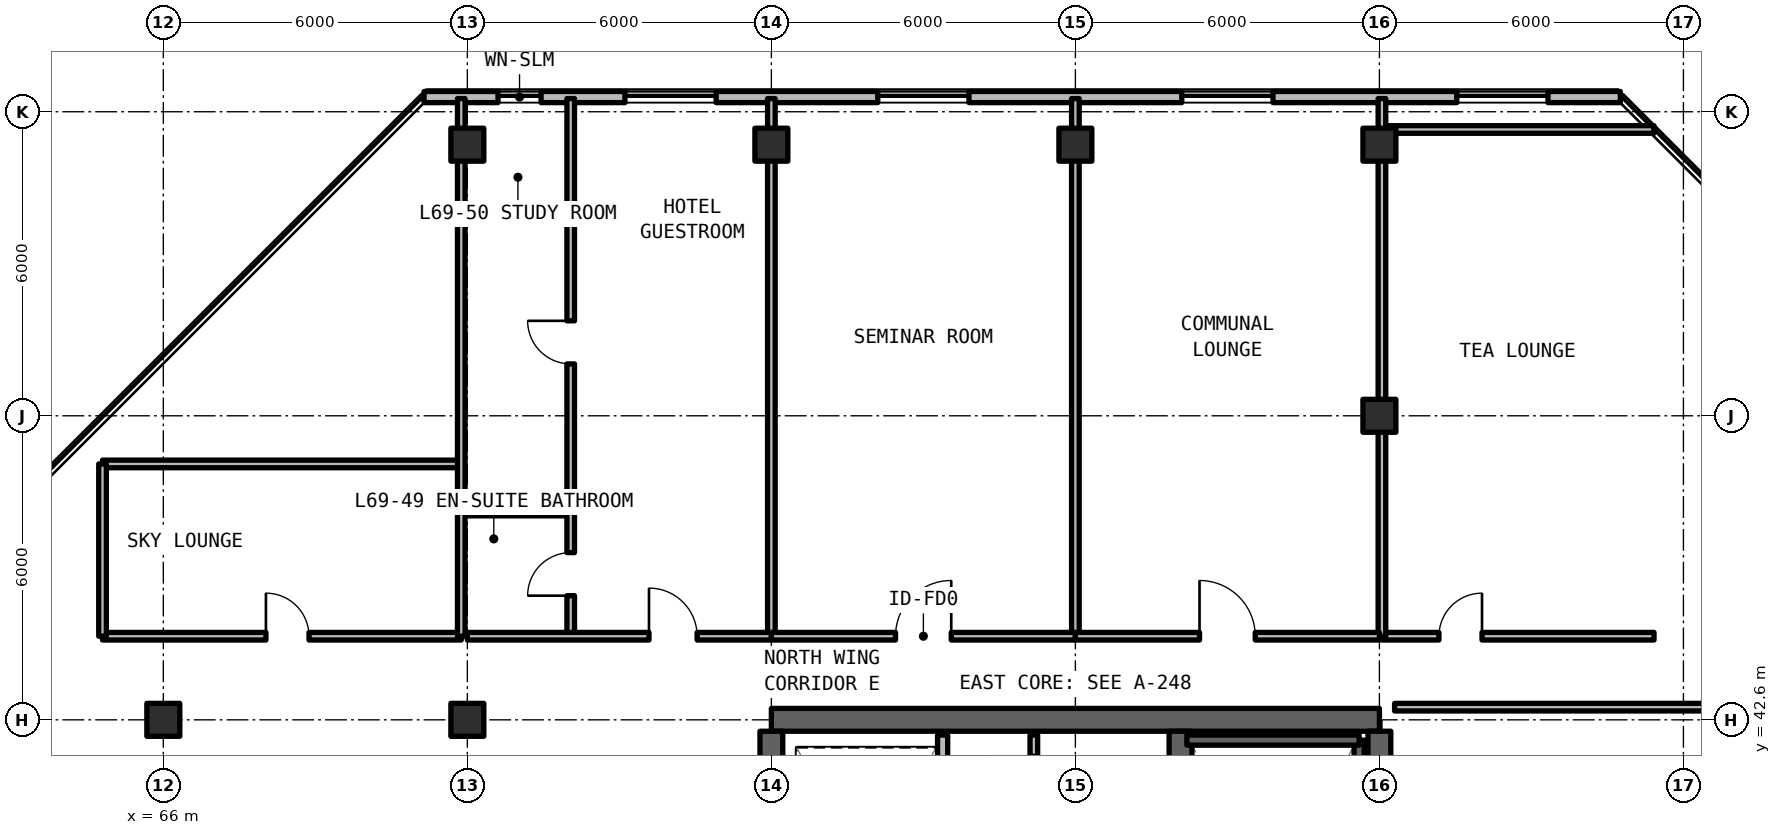
"""IFC4 building model, lengths in metres.
Left out: names, types, materials, properties, quantities, classifications, styles, units other than length and angle.
Written with IfcOpenShell. Run it as: python <this file> out.ifc"""

import sys

from ifc_helpers import new_model, si_unit, direction, frame, frame_2d, origin, origin_2d, place, context, subcontext, project, spatial, rectangle, extrude, element, fill, save


model = new_model("IFC4")
c1 = context("Model", 3, precision=1e-05, world=origin(), true_north=direction((0.0, 1.0)))
c2 = subcontext(c1, "Body", "Model", "MODEL_VIEW")
j1 = project(units=[si_unit("LENGTHUNIT", "METRE"), si_unit("PLANEANGLEUNIT", "RADIAN")], contexts=[c1])
p1 = place(None, origin())
s1 = spatial("IfcSite", under=j1, at=p1, CompositionType="ELEMENT")
p2 = place(p1, origin())
s2 = spatial("IfcBuilding", under=s1, at=p2, CompositionType="ELEMENT")
p3 = place(p2, frame((0.0, 0.0, 246.18)))
s3 = spatial("IfcBuildingStorey", under=s2, at=p3, CompositionType="ELEMENT", Elevation=246.18)
p4 = place(p3, frame((90.0, 42.6, 0.0), z_axis=(0.0, 0.0, 1.0), x_axis=(-1.0, 0.0, 0.0)))
e1 = element("IfcWall", 1, at=p4, inside=s3, PredefinedType="SHEAR", context=c2, shape_type="SweptSolid", body=[
    extrude(rectangle(XDim=12.0, YDim=0.45, at=frame_2d((6.0, 0.0))), origin(), (0.0, 0.0, 1.0), 3.63),
])
p5 = place(p3, frame((90.0, 24.825, 0.0), z_axis=(0.0, 0.0, 1.0), x_axis=(0.0, 1.0, 0.0)))
e2 = element("IfcWall", 2, at=p5, inside=s3, PredefinedType="SHEAR", context=c2, shape_type="SweptSolid", body=[
    extrude(rectangle(XDim=17.55, YDim=0.45, at=frame_2d((8.775, 0.0))), origin(), (0.0, 0.0, 1.0), 3.63),
])
p6 = place(p3, frame((78.0, 36.8, 0.0), z_axis=(0.0, 0.0, 1.0), x_axis=(0.0, 1.0, 0.0)))
e3 = element("IfcWall", 3, at=p6, inside=s3, PredefinedType="SHEAR", context=c2, shape_type="SweptSolid", body=[
    extrude(rectangle(XDim=5.575, YDim=0.45, at=frame_2d((2.788, 0.0))), origin(), (0.0, 0.0, 1.0), 3.63),
])
p7 = place(p3, frame((86.075, 24.825, 0.0), z_axis=(0.0, 0.0, 1.0), x_axis=(0.0, 1.0, 0.0)))
e4 = element("IfcWall", 4, at=p7, inside=s3, PredefinedType="SHEAR", context=c2, shape_type="SweptSolid", body=[
    extrude(rectangle(XDim=17.55, YDim=0.45, at=frame_2d((8.775, 0.0))), origin(), (0.0, 0.0, 1.0), 3.63),
])
p8 = place(p7, frame((0.425, 0.0, 0.0)))
e5 = element("IfcOpeningElement", 5, at=p8, cuts=e4, PredefinedType="OPENING", context=c2, shape_type="SweptSolid", body=[
    extrude(rectangle(XDim=1.15, YDim=2.15, at=frame_2d((0.575, 1.075))), frame((0.0, 0.235, 0.0), z_axis=(0.0, -1.0, 0.0), x_axis=(1.0, 0.0, 0.0)), (0.0, 0.0, 1.0), 0.47),
])
p9 = place(p7, frame((9.625, 0.0, 0.0)))
e6 = element("IfcOpeningElement", 6, at=p9, cuts=e4, PredefinedType="OPENING", context=c2, shape_type="SweptSolid", body=[
    extrude(rectangle(XDim=1.15, YDim=2.15, at=frame_2d((0.575, 1.075))), frame((0.0, 0.235, 0.0), z_axis=(0.0, -1.0, 0.0), x_axis=(1.0, 0.0, 0.0)), (0.0, 0.0, 1.0), 0.47),
])
for number, where, z_axis, x_axis in (
    (7, (66.0, 42.6, 0.0), (0.0, 0.0, 1.0), (1.0, 0.0, 0.0)),
    (8, (72.0, 42.6, 0.0), (0.0, 0.0, 1.0), (1.0, 0.0, 0.0)),
    (9, (90.0, 48.6, 0.0), (0.0, 0.0, 1.0), (1.0, 0.0, 0.0)),
    (10, (72.0, 53.95, 0.0), (0.0, 0.0, 1.0), (1.0, 0.0, 0.0)),
    (11, (78.0, 53.95, 0.0), (0.0, 0.0, 1.0), (1.0, 0.0, 0.0)),
    (12, (84.0, 53.95, 0.0), (0.0, 0.0, 1.0), (1.0, 0.0, 0.0)),
    (13, (90.0, 53.95, 0.0), (0.0, 0.0, 1.0), (1.0, 0.0, 0.0)),
):
    element("IfcColumn", number, at=place(p3, frame(where, z_axis=z_axis, x_axis=x_axis)), inside=s3, PredefinedType="COLUMN", context=c2, shape_type="SweptSolid", body=[
        extrude(rectangle(XDim=0.65, YDim=0.65, at=origin_2d()), origin(), (0.0, 0.0, 1.0), 3.63),
    ])
p10 = place(p3, frame((94.754, 54.89, 0.0), z_axis=(0.0, 0.0, 1.0), x_axis=(-1.0, 0.0, 0.0)))
e14 = element("IfcWall", 14, at=p10, inside=s3, PredefinedType="SOLIDWALL", context=c2, shape_type="SweptSolid", body=[
    extrude(rectangle(XDim=23.609, YDim=0.22, at=frame_2d((11.804, 0.0))), origin(), (0.0, 0.0, 1.0), 3.41),
])
p11 = place(p10, frame((1.427, 0.0, 0.78)))
e15 = element("IfcOpeningElement", 15, at=p11, cuts=e14, PredefinedType="OPENING", context=c2, shape_type="SweptSolid", body=[
    extrude(rectangle(XDim=1.8, YDim=1.66, at=frame_2d((0.9, 0.83))), frame((0.0, 0.12, 0.0), z_axis=(0.0, -1.0, 0.0), x_axis=(1.0, 0.0, 0.0)), (0.0, 0.0, 1.0), 0.24),
])
p12 = place(p10, frame((21.299, 0.0, 0.78)))
e16 = element("IfcOpeningElement", 16, at=p12, cuts=e14, PredefinedType="OPENING", context=c2, shape_type="SweptSolid", body=[
    extrude(rectangle(XDim=0.85, YDim=1.65, at=frame_2d((0.425, 0.825))), frame((0.0, 0.12, 0.0), z_axis=(0.0, -1.0, 0.0), x_axis=(1.0, 0.0, 0.0)), (0.0, 0.0, 1.0), 0.24),
])
p13 = place(p10, frame((17.844, 0.0, 0.78)))
e17 = element("IfcOpeningElement", 17, at=p13, cuts=e14, PredefinedType="OPENING", context=c2, shape_type="SweptSolid", body=[
    extrude(rectangle(XDim=1.8, YDim=1.66, at=frame_2d((0.9, 0.83))), frame((0.0, 0.12, 0.0), z_axis=(0.0, -1.0, 0.0), x_axis=(1.0, 0.0, 0.0)), (0.0, 0.0, 1.0), 0.24),
])
p14 = place(p10, frame((12.854, 0.0, 0.78)))
e18 = element("IfcOpeningElement", 18, at=p14, cuts=e14, PredefinedType="OPENING", context=c2, shape_type="SweptSolid", body=[
    extrude(rectangle(XDim=1.8, YDim=1.66, at=frame_2d((0.9, 0.83))), frame((0.0, 0.12, 0.0), z_axis=(0.0, -1.0, 0.0), x_axis=(1.0, 0.0, 0.0)), (0.0, 0.0, 1.0), 0.24),
])
p15 = place(p10, frame((6.854, 0.0, 0.78)))
e19 = element("IfcOpeningElement", 19, at=p15, cuts=e14, PredefinedType="OPENING", context=c2, shape_type="SweptSolid", body=[
    extrude(rectangle(XDim=1.8, YDim=1.66, at=frame_2d((0.9, 0.83))), frame((0.0, 0.12, 0.0), z_axis=(0.0, -1.0, 0.0), x_axis=(1.0, 0.0, 0.0)), (0.0, 0.0, 1.0), 0.24),
])
p16 = place(p3, frame((83.18, 36.88, 0.0), z_axis=(0.0, 0.0, 1.0), x_axis=(0.0, 1.0, 0.0)))
e20 = element("IfcWall", 20, at=p16, inside=s3, PredefinedType="SOLIDWALL", context=c2, shape_type="SweptSolid", body=[
    extrude(rectangle(XDim=5.42, YDim=0.15, at=frame_2d((2.71, 0.0))), origin(), (0.0, 0.0, 1.0), 2.63),
])
p17 = place(p16, frame((1.15, 0.0, 0.0)))
e21 = element("IfcOpeningElement", 21, at=p17, cuts=e20, PredefinedType="OPENING", context=c2, shape_type="SweptSolid", body=[
    extrude(rectangle(XDim=0.95, YDim=2.15, at=frame_2d((0.475, 1.075))), frame((0.0, 0.085, 0.0), z_axis=(0.0, -1.0, 0.0), x_axis=(1.0, 0.0, 0.0)), (0.0, 0.0, 1.0), 0.17),
])
p18 = place(p16, frame((4.05, 0.0, 0.0)))
e22 = element("IfcOpeningElement", 22, at=p18, cuts=e20, PredefinedType="OPENING", context=c2, shape_type="SweptSolid", body=[
    extrude(rectangle(XDim=0.95, YDim=2.15, at=frame_2d((0.475, 1.075))), frame((0.0, 0.085, 0.0), z_axis=(0.0, -1.0, 0.0), x_axis=(1.0, 0.0, 0.0)), (0.0, 0.0, 1.0), 0.17),
])
p19 = place(p3, frame((81.38, 36.88, 0.0), z_axis=(0.0, 0.0, 1.0), x_axis=(0.0, 1.0, 0.0)))
e23 = element("IfcWall", 23, at=p19, inside=s3, PredefinedType="SOLIDWALL", context=c2, shape_type="SweptSolid", body=[
    extrude(rectangle(XDim=5.42, YDim=0.2, at=frame_2d((2.71, 0.0))), origin(), (0.0, 0.0, 1.0), 2.63),
])
p20 = place(p19, frame((0.8, 0.0, 0.0)))
e24 = element("IfcOpeningElement", 24, at=p20, cuts=e23, PredefinedType="OPENING", context=c2, shape_type="SweptSolid", body=[
    extrude(rectangle(XDim=1.1, YDim=2.2, at=frame_2d((0.55, 1.1))), frame((0.0, 0.11, 0.0), z_axis=(0.0, -1.0, 0.0), x_axis=(1.0, 0.0, 0.0)), (0.0, 0.0, 1.0), 0.22),
])
p21 = place(p19, frame((3.3, 0.0, 0.0)))
e25 = element("IfcOpeningElement", 25, at=p21, cuts=e23, PredefinedType="OPENING", context=c2, shape_type="SweptSolid", body=[
    extrude(rectangle(XDim=1.1, YDim=2.2, at=frame_2d((0.55, 1.1))), frame((0.0, 0.11, 0.0), z_axis=(0.0, -1.0, 0.0), x_axis=(1.0, 0.0, 0.0)), (0.0, 0.0, 1.0), 0.22),
])
p22 = place(p3, frame((64.8, 44.25, 0.0), z_axis=(0.0, 0.0, 1.0), x_axis=(1.0, 0.0, 0.0)))
e26 = element("IfcWall", 26, at=p22, inside=s3, PredefinedType="SOLIDWALL", context=c2, shape_type="SweptSolid", body=[
    extrude(rectangle(XDim=7.08, YDim=0.15, at=frame_2d((3.54, 0.0))), origin(), (0.0, 0.0, 1.0), 2.63),
])
p23 = place(p22, frame((3.225, 0.0, 0.0)))
e27 = element("IfcOpeningElement", 27, at=p23, cuts=e26, PredefinedType="OPENING", context=c2, shape_type="SweptSolid", body=[
    extrude(rectangle(XDim=0.85, YDim=2.1, at=frame_2d((0.425, 1.05))), frame((0.0, 0.085, 0.0), z_axis=(0.0, -1.0, 0.0), x_axis=(1.0, 0.0, 0.0)), (0.0, 0.0, 1.0), 0.17),
])
p24 = place(p3, frame((64.8, 47.65, 0.0), z_axis=(0.0, 0.0, 1.0), x_axis=(1.0, 0.0, 0.0)))
e28 = element("IfcWall", 28, at=p24, inside=s3, PredefinedType="SOLIDWALL", context=c2, shape_type="SweptSolid", body=[
    extrude(rectangle(XDim=7.08, YDim=0.15, at=frame_2d((3.54, 0.0))), origin(), (0.0, 0.0, 1.0), 2.63),
])
p25 = place(p3, frame((64.8, 44.25, 0.0), z_axis=(0.0, 0.0, 1.0), x_axis=(0.0, 1.0, 0.0)))
e29 = element("IfcWall", 29, at=p25, inside=s3, PredefinedType="SOLIDWALL", context=c2, shape_type="SweptSolid", body=[
    extrude(rectangle(XDim=3.4, YDim=0.15, at=frame_2d((1.7, 0.0))), origin(), (0.0, 0.0, 1.0), 2.63),
])
p26 = place(p3, frame((71.88, 44.25, 0.0), z_axis=(0.0, 0.0, 1.0), x_axis=(0.0, 1.0, 0.0)))
e30 = element("IfcWall", 30, at=p26, inside=s3, PredefinedType="SOLIDWALL", context=c2, shape_type="SweptSolid", body=[
    extrude(rectangle(XDim=10.61, YDim=0.15, at=frame_2d((5.305, 0.0))), origin(), (0.0, 0.0, 1.0), 2.63),
])
p27 = place(p3, frame((90.3, 42.85, 0.0), z_axis=(0.0, 0.0, 1.0), x_axis=(1.0, 0.0, 0.0)))
e31 = element("IfcWall", 31, at=p27, inside=s3, PredefinedType="SOLIDWALL", context=c2, shape_type="SweptSolid", body=[
    extrude(rectangle(XDim=8.52, YDim=0.15, at=frame_2d((4.26, 0.0))), origin(), (0.0, 0.0, 1.0), 2.63),
])
p28 = place(p3, frame((90.05, 44.25, 0.0), z_axis=(0.0, 0.0, 1.0), x_axis=(1.0, 0.0, 0.0)))
e32 = element("IfcWall", 32, at=p28, inside=s3, PredefinedType="SOLIDWALL", context=c2, shape_type="SweptSolid", body=[
    extrude(rectangle(XDim=5.37, YDim=0.15, at=frame_2d((2.685, 0.0))), origin(), (0.0, 0.0, 1.0), 2.63),
])
p29 = place(p28, frame((1.125, 0.0, 0.0)))
e33 = element("IfcOpeningElement", 33, at=p29, cuts=e32, PredefinedType="OPENING", context=c2, shape_type="SweptSolid", body=[
    extrude(rectangle(XDim=0.85, YDim=2.1, at=frame_2d((0.425, 1.05))), frame((0.0, 0.085, 0.0), z_axis=(0.0, -1.0, 0.0), x_axis=(1.0, 0.0, 0.0)), (0.0, 0.0, 1.0), 0.17),
])
p30 = place(p3, frame((90.05, 54.25, 0.0), z_axis=(0.0, 0.0, 1.0), x_axis=(1.0, 0.0, 0.0)))
e34 = element("IfcWall", 34, at=p30, inside=s3, PredefinedType="SOLIDWALL", context=c2, shape_type="SweptSolid", body=[
    extrude(rectangle(XDim=5.37, YDim=0.15, at=frame_2d((2.685, 0.0))), origin(), (0.0, 0.0, 1.0), 2.63),
])
for number, where, z_axis, x_axis in (
    (35, (90.05, 44.25, 0.0), (0.0, 0.0, 1.0), (0.0, 1.0, 0.0)),
    (36, (78.0, 44.25, 0.0), (0.0, 0.0, 1.0), (0.0, 1.0, 0.0)),
):
    element("IfcWall", number, at=place(p3, frame(where, z_axis=z_axis, x_axis=x_axis)), inside=s3, PredefinedType="SOLIDWALL", context=c2, shape_type="SweptSolid", body=[
        extrude(rectangle(XDim=10.61, YDim=0.15, at=frame_2d((5.305, 0.0))), origin(), (0.0, 0.0, 1.0), 2.63),
    ])
p31 = place(p3, frame((72.0, 46.7, 0.0), z_axis=(0.0, 0.0, 1.0), x_axis=(1.0, 0.0, 0.0)))
e37 = element("IfcWall", 37, at=p31, inside=s3, PredefinedType="PARTITIONING", context=c2, shape_type="SweptSolid", body=[
    extrude(rectangle(XDim=2.04, YDim=0.15, at=frame_2d((1.02, 0.0))), origin(), (0.0, 0.0, 1.0), 2.63),
])
p32 = place(p3, frame((74.04, 44.25, 0.0), z_axis=(0.0, 0.0, 1.0), x_axis=(0.0, 1.0, 0.0)))
e38 = element("IfcWall", 38, at=p32, inside=s3, PredefinedType="PARTITIONING", context=c2, shape_type="SweptSolid", body=[
    extrude(rectangle(XDim=10.61, YDim=0.15, at=frame_2d((5.305, 0.0))), origin(), (0.0, 0.0, 1.0), 2.63),
])
p33 = place(p32, frame((0.8, 0.0, 0.0)))
e39 = element("IfcOpeningElement", 39, at=p33, cuts=e38, PredefinedType="OPENING", context=c2, shape_type="SweptSolid", body=[
    extrude(rectangle(XDim=0.85, YDim=2.1, at=frame_2d((0.425, 1.05))), frame((0.0, 0.085, 0.0), z_axis=(0.0, -1.0, 0.0), x_axis=(1.0, 0.0, 0.0)), (0.0, 0.0, 1.0), 0.17),
])
p34 = place(p32, frame((5.374, 0.0, 0.0)))
e40 = element("IfcOpeningElement", 40, at=p34, cuts=e38, PredefinedType="OPENING", context=c2, shape_type="SweptSolid", body=[
    extrude(rectangle(XDim=0.85, YDim=2.1, at=frame_2d((0.425, 1.05))), frame((0.0, 0.085, 0.0), z_axis=(0.0, -1.0, 0.0), x_axis=(1.0, 0.0, 0.0)), (0.0, 0.0, 1.0), 0.17),
])
p35 = place(p3, frame((72.0, 44.25, 0.0), z_axis=(0.0, 0.0, 1.0), x_axis=(1.0, 0.0, 0.0)))
e41 = element("IfcWall", 41, at=p35, inside=s3, PredefinedType="SOLIDWALL", context=c2, shape_type="SweptSolid", body=[
    extrude(rectangle(XDim=6.0, YDim=0.15, at=frame_2d((3.0, 0.0))), origin(), (0.0, 0.0, 1.0), 2.63),
])
p36 = place(p35, frame((3.585, 0.0, 0.0)))
e42 = element("IfcOpeningElement", 42, at=p36, cuts=e41, PredefinedType="OPENING", context=c2, shape_type="SweptSolid", body=[
    extrude(rectangle(XDim=0.95, YDim=2.15, at=frame_2d((0.475, 1.075))), frame((0.0, 0.085, 0.0), z_axis=(0.0, -1.0, 0.0), x_axis=(1.0, 0.0, 0.0)), (0.0, 0.0, 1.0), 0.17),
])
p37 = place(p3, frame((84.0, 44.25, 0.0), z_axis=(0.0, 0.0, 1.0), x_axis=(0.0, 1.0, 0.0)))
e43 = element("IfcWall", 43, at=p37, inside=s3, PredefinedType="SOLIDWALL", context=c2, shape_type="SweptSolid", body=[
    extrude(rectangle(XDim=10.61, YDim=0.15, at=frame_2d((5.305, 0.0))), origin(), (0.0, 0.0, 1.0), 2.63),
])
p38 = place(p3, frame((78.0, 44.25, 0.0), z_axis=(0.0, 0.0, 1.0), x_axis=(1.0, 0.0, 0.0)))
e44 = element("IfcWall", 44, at=p38, inside=s3, PredefinedType="SOLIDWALL", context=c2, shape_type="SweptSolid", body=[
    extrude(rectangle(XDim=6.0, YDim=0.15, at=frame_2d((3.0, 0.0))), origin(), (0.0, 0.0, 1.0), 2.63),
])
p39 = place(p38, frame((2.45, 0.0, 0.0)))
e45 = element("IfcOpeningElement", 45, at=p39, cuts=e44, PredefinedType="OPENING", context=c2, shape_type="SweptSolid", body=[
    extrude(rectangle(XDim=1.1, YDim=2.15, at=frame_2d((0.55, 1.075))), frame((0.0, 0.085, 0.0), z_axis=(0.0, -1.0, 0.0), x_axis=(1.0, 0.0, 0.0)), (0.0, 0.0, 1.0), 0.17),
])
p40 = place(p3, frame((84.0, 44.25, 0.0), z_axis=(0.0, 0.0, 1.0), x_axis=(1.0, 0.0, 0.0)))
e46 = element("IfcWall", 46, at=p40, inside=s3, PredefinedType="SOLIDWALL", context=c2, shape_type="SweptSolid", body=[
    extrude(rectangle(XDim=6.0, YDim=0.15, at=frame_2d((3.0, 0.0))), origin(), (0.0, 0.0, 1.0), 2.63),
])
p41 = place(p40, frame((2.45, 0.0, 0.0)))
e47 = element("IfcOpeningElement", 47, at=p41, cuts=e46, PredefinedType="OPENING", context=c2, shape_type="SweptSolid", body=[
    extrude(rectangle(XDim=1.1, YDim=2.15, at=frame_2d((0.55, 1.075))), frame((0.0, 0.085, 0.0), z_axis=(0.0, -1.0, 0.0), x_axis=(1.0, 0.0, 0.0)), (0.0, 0.0, 1.0), 0.17),
])
p42 = place(p3, frame((89.6, 34.2, 0.0), z_axis=(0.0, 0.0, 1.0), x_axis=(0.0, 1.0, 0.0)))
e48 = element("IfcWall", 48, at=p42, inside=s3, PredefinedType="SOLIDWALL", context=c2, shape_type="SweptSolid", body=[
    extrude(rectangle(XDim=8.0, YDim=0.2, at=frame_2d((4.0, 0.0))), origin(), (0.0, 0.0, 1.0), 3.63),
])
p43 = place(p3, frame((89.6, 42.2, 0.0), z_axis=(0.0, 0.0, 1.0), x_axis=(-1.0, 0.0, 0.0)))
e49 = element("IfcWall", 49, at=p43, inside=s3, PredefinedType="SOLIDWALL", context=c2, shape_type="SweptSolid", body=[
    extrude(rectangle(XDim=3.4, YDim=0.2, at=frame_2d((1.7, 0.0))), origin(), (0.0, 0.0, 1.0), 3.63),
])
p44 = place(p11, origin())
e50 = element("IfcWindow", 50, at=p44, inside=s3, PartitioningType="SINGLE_PANEL", PredefinedType="WINDOW", context=c2, shape_type="SweptSolid", body=[
    extrude(rectangle(XDim=1.8, YDim=1.66, at=frame_2d((0.9, 0.83))), frame((0.0, 0.03, 0.0), z_axis=(0.0, -1.0, 0.0), x_axis=(1.0, 0.0, 0.0)), (0.0, 0.0, 1.0), 0.06),
])
fill(e15, e50)
p45 = place(p12, origin())
e51 = element("IfcWindow", 51, at=p45, inside=s3, PartitioningType="SINGLE_PANEL", PredefinedType="WINDOW", context=c2, shape_type="SweptSolid", body=[
    extrude(rectangle(XDim=0.85, YDim=1.65, at=frame_2d((0.425, 0.825))), frame((0.0, 0.03, 0.0), z_axis=(0.0, -1.0, 0.0), x_axis=(1.0, 0.0, 0.0)), (0.0, 0.0, 1.0), 0.06),
])
fill(e16, e51)
p46 = place(p13, origin())
e52 = element("IfcWindow", 52, at=p46, inside=s3, PartitioningType="SINGLE_PANEL", PredefinedType="WINDOW", context=c2, shape_type="SweptSolid", body=[
    extrude(rectangle(XDim=1.8, YDim=1.66, at=frame_2d((0.9, 0.83))), frame((0.0, 0.03, 0.0), z_axis=(0.0, -1.0, 0.0), x_axis=(1.0, 0.0, 0.0)), (0.0, 0.0, 1.0), 0.06),
])
fill(e17, e52)
p47 = place(p14, origin())
e53 = element("IfcWindow", 53, at=p47, inside=s3, PartitioningType="SINGLE_PANEL", PredefinedType="WINDOW", context=c2, shape_type="SweptSolid", body=[
    extrude(rectangle(XDim=1.8, YDim=1.66, at=frame_2d((0.9, 0.83))), frame((0.0, 0.03, 0.0), z_axis=(0.0, -1.0, 0.0), x_axis=(1.0, 0.0, 0.0)), (0.0, 0.0, 1.0), 0.06),
])
fill(e18, e53)
p48 = place(p15, origin())
e54 = element("IfcWindow", 54, at=p48, inside=s3, PartitioningType="SINGLE_PANEL", PredefinedType="WINDOW", context=c2, shape_type="SweptSolid", body=[
    extrude(rectangle(XDim=1.8, YDim=1.66, at=frame_2d((0.9, 0.83))), frame((0.0, 0.03, 0.0), z_axis=(0.0, -1.0, 0.0), x_axis=(1.0, 0.0, 0.0)), (0.0, 0.0, 1.0), 0.06),
])
fill(e19, e54)
p49 = place(p23, origin())
e55 = element("IfcDoor", 55, at=p49, inside=s3, OperationType="SINGLE_SWING_LEFT", PredefinedType="DOOR", context=c2, shape_type="SweptSolid", body=[
    extrude(rectangle(XDim=0.85, YDim=2.1, at=frame_2d((0.425, 1.05))), frame((0.0, 0.025, 0.0), z_axis=(0.0, -1.0, 0.0), x_axis=(1.0, 0.0, 0.0)), (0.0, 0.0, 1.0), 0.05),
])
fill(e27, e55)
p50 = place(p29, origin())
e56 = element("IfcDoor", 56, at=p50, inside=s3, OperationType="SINGLE_SWING_RIGHT", PredefinedType="DOOR", context=c2, shape_type="SweptSolid", body=[
    extrude(rectangle(XDim=0.85, YDim=2.1, at=frame_2d((0.425, 1.05))), frame((0.0, 0.025, 0.0), z_axis=(0.0, -1.0, 0.0), x_axis=(1.0, 0.0, 0.0)), (0.0, 0.0, 1.0), 0.05),
])
fill(e33, e56)
p51 = place(p33, origin())
e57 = element("IfcDoor", 57, at=p51, inside=s3, OperationType="SINGLE_SWING_LEFT", PredefinedType="DOOR", context=c2, shape_type="SweptSolid", body=[
    extrude(rectangle(XDim=0.85, YDim=2.1, at=frame_2d((0.425, 1.05))), frame((0.0, 0.025, 0.0), z_axis=(0.0, -1.0, 0.0), x_axis=(1.0, 0.0, 0.0)), (0.0, 0.0, 1.0), 0.05),
])
fill(e39, e57)
p52 = place(p34, origin())
e58 = element("IfcDoor", 58, at=p52, inside=s3, OperationType="SINGLE_SWING_RIGHT", PredefinedType="DOOR", context=c2, shape_type="SweptSolid", body=[
    extrude(rectangle(XDim=0.85, YDim=2.1, at=frame_2d((0.425, 1.05))), frame((0.0, 0.025, 0.0), z_axis=(0.0, -1.0, 0.0), x_axis=(1.0, 0.0, 0.0)), (0.0, 0.0, 1.0), 0.05),
])
fill(e40, e58)
p53 = place(p36, origin())
e59 = element("IfcDoor", 59, at=p53, inside=s3, OperationType="SINGLE_SWING_LEFT", PredefinedType="DOOR", context=c2, shape_type="SweptSolid", body=[
    extrude(rectangle(XDim=0.95, YDim=2.15, at=frame_2d((0.475, 1.075))), frame((0.0, 0.025, 0.0), z_axis=(0.0, -1.0, 0.0), x_axis=(1.0, 0.0, 0.0)), (0.0, 0.0, 1.0), 0.05),
])
fill(e42, e59)
p54 = place(p39, origin())
e60 = element("IfcDoor", 60, at=p54, inside=s3, OperationType="SINGLE_SWING_RIGHT", PredefinedType="DOOR", context=c2, shape_type="SweptSolid", body=[
    extrude(rectangle(XDim=1.1, YDim=2.15, at=frame_2d((0.55, 1.075))), frame((0.0, 0.025, 0.0), z_axis=(0.0, -1.0, 0.0), x_axis=(1.0, 0.0, 0.0)), (0.0, 0.0, 1.0), 0.05),
])
fill(e45, e60)
p55 = place(p41, origin())
e61 = element("IfcDoor", 61, at=p55, inside=s3, OperationType="SINGLE_SWING_LEFT", PredefinedType="DOOR", context=c2, shape_type="SweptSolid", body=[
    extrude(rectangle(XDim=1.1, YDim=2.15, at=frame_2d((0.55, 1.075))), frame((0.0, 0.025, 0.0), z_axis=(0.0, -1.0, 0.0), x_axis=(1.0, 0.0, 0.0)), (0.0, 0.0, 1.0), 0.05),
])
fill(e47, e61)
save(model, sys.argv[1])
